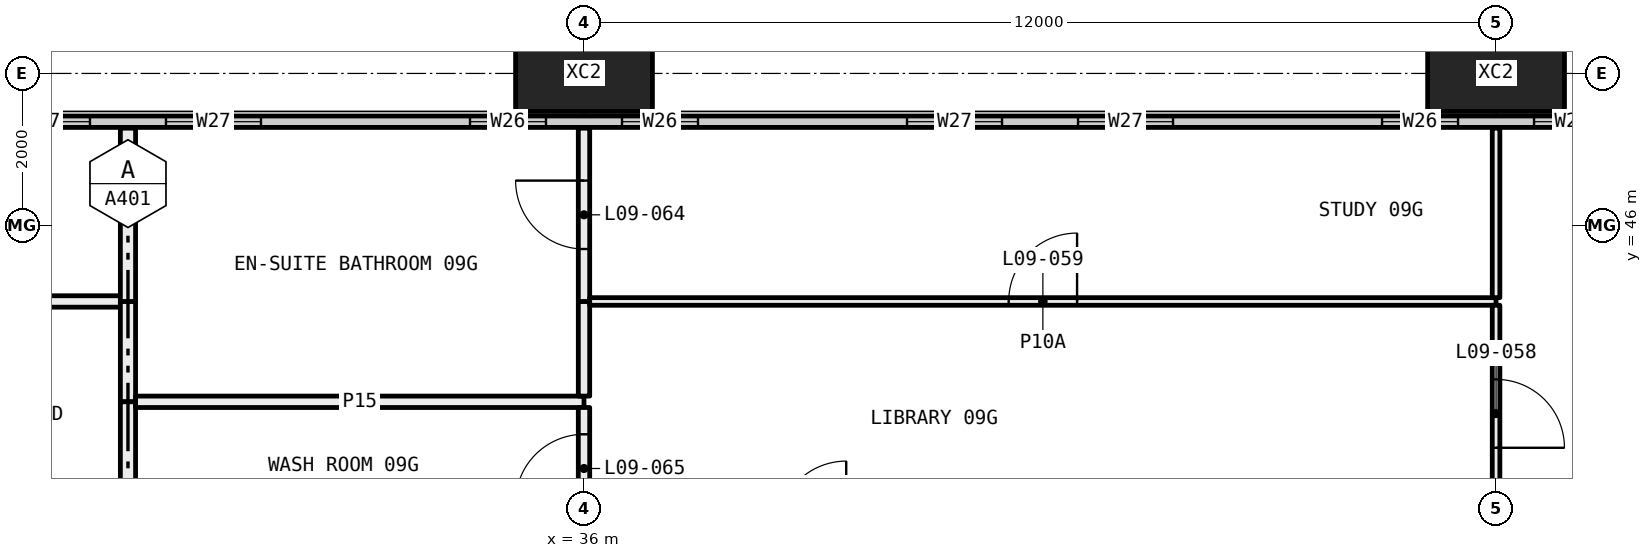
"""IFC4 building model, lengths in metres.
Left out: names, types, materials, properties, quantities, classifications, styles, units other than length and angle.
Written with IfcOpenShell. Run it as: python <this file> out.ifc"""

import sys

from ifc_helpers import new_model, si_unit, direction, frame, frame_2d, origin, origin_2d, place, context, subcontext, project, spatial, rectangle, hollow_rectangle, extrude, element, fill, save


model = new_model("IFC4")
c1 = context("Model", 3, precision=1e-05, world=origin(), true_north=direction((0.0, 1.0)))
c2 = subcontext(c1, "Body", "Model", "MODEL_VIEW")
j1 = project(units=[si_unit("LENGTHUNIT", "METRE"), si_unit("PLANEANGLEUNIT", "RADIAN")], contexts=[c1])
p1 = place(None, origin())
s1 = spatial("IfcSite", under=j1, at=p1, CompositionType="ELEMENT")
p2 = place(p1, origin())
s2 = spatial("IfcBuilding", under=s1, at=p2, CompositionType="ELEMENT")
p3 = place(p2, frame((0.0, 0.0, 43.8)))
s3 = spatial("IfcBuildingStorey", under=s2, at=p3, CompositionType="ELEMENT", Elevation=43.8)
for number, where, z_axis, x_axis in (
    (1, (36.0, 48.0, -0.4), (0.0, 0.0, 1.0), (1.0, 0.0, 0.0)),
    (2, (48.0, 48.0, -0.4), (0.0, 0.0, 1.0), (1.0, 0.0, 0.0)),
):
    element("IfcColumn", number, at=place(p3, frame(where, z_axis=z_axis, x_axis=x_axis)), inside=s3, PredefinedType="COLUMN", context=c2, shape_type="SweptSolid", body=[
        extrude(hollow_rectangle(XDim=1.8, YDim=1.0, WallThickness=0.07, at=origin_2d()), origin(), (0.0, 0.0, 1.0), 3.45),
    ])
p4 = place(p3, frame((6.56, 47.365, 0.0), z_axis=(0.0, 0.0, 1.0), x_axis=(1.0, 0.0, 0.0)))
e3 = element("IfcWall", 3, at=p4, inside=s3, PredefinedType="ELEMENTEDWALL", context=c2, shape_type="SweptSolid", body=[
    extrude(rectangle(XDim=58.88, YDim=0.15, at=frame_2d((29.44, 0.0))), origin(), (0.0, 0.0, 1.0), 3.05),
])
p5 = place(p4, frame((0.44, 0.0, 0.45)))
e4 = element("IfcOpeningElement", 4, at=p5, cuts=e3, PredefinedType="OPENING", context=c2, shape_type="SweptSolid", body=[
    extrude(rectangle(XDim=4.5, YDim=2.55, at=frame_2d((2.25, 1.275))), frame((0.0, 0.085, 0.0), z_axis=(0.0, -1.0, 0.0), x_axis=(1.0, 0.0, 0.0)), (0.0, 0.0, 1.0), 0.17),
])
p6 = place(p4, frame((5.94, 0.0, 0.45)))
e5 = element("IfcOpeningElement", 5, at=p6, cuts=e3, PredefinedType="OPENING", context=c2, shape_type="SweptSolid", body=[
    extrude(rectangle(XDim=1.0, YDim=2.55, at=frame_2d((0.5, 1.275))), frame((0.0, 0.085, 0.0), z_axis=(0.0, -1.0, 0.0), x_axis=(1.0, 0.0, 0.0)), (0.0, 0.0, 1.0), 0.17),
])
p7 = place(p4, frame((9.69, 0.0, 0.45)))
e6 = element("IfcOpeningElement", 6, at=p7, cuts=e3, PredefinedType="OPENING", context=c2, shape_type="SweptSolid", body=[
    extrude(rectangle(XDim=1.25, YDim=2.55, at=frame_2d((0.625, 1.275))), frame((0.0, 0.085, 0.0), z_axis=(0.0, -1.0, 0.0), x_axis=(1.0, 0.0, 0.0)), (0.0, 0.0, 1.0), 0.17),
])
p8 = place(p4, frame((11.94, 0.0, 0.45)))
e7 = element("IfcOpeningElement", 7, at=p8, cuts=e3, PredefinedType="OPENING", context=c2, shape_type="SweptSolid", body=[
    extrude(rectangle(XDim=1.25, YDim=2.55, at=frame_2d((0.625, 1.275))), frame((0.0, 0.085, 0.0), z_axis=(0.0, -1.0, 0.0), x_axis=(1.0, 0.0, 0.0)), (0.0, 0.0, 1.0), 0.17),
])
p9 = place(p4, frame((15.94, 0.0, 0.45)))
e8 = element("IfcOpeningElement", 8, at=p9, cuts=e3, PredefinedType="OPENING", context=c2, shape_type="SweptSolid", body=[
    extrude(rectangle(XDim=1.0, YDim=2.55, at=frame_2d((0.5, 1.275))), frame((0.0, 0.085, 0.0), z_axis=(0.0, -1.0, 0.0), x_axis=(1.0, 0.0, 0.0)), (0.0, 0.0, 1.0), 0.17),
])
p10 = place(p4, frame((17.94, 0.0, 0.45)))
e9 = element("IfcOpeningElement", 9, at=p10, cuts=e3, PredefinedType="OPENING", context=c2, shape_type="SweptSolid", body=[
    extrude(rectangle(XDim=1.0, YDim=2.55, at=frame_2d((0.5, 1.275))), frame((0.0, 0.085, 0.0), z_axis=(0.0, -1.0, 0.0), x_axis=(1.0, 0.0, 0.0)), (0.0, 0.0, 1.0), 0.17),
])
p11 = place(p4, frame((21.69, 0.0, 0.45)))
e10 = element("IfcOpeningElement", 10, at=p11, cuts=e3, PredefinedType="OPENING", context=c2, shape_type="SweptSolid", body=[
    extrude(rectangle(XDim=1.25, YDim=2.55, at=frame_2d((0.625, 1.275))), frame((0.0, 0.085, 0.0), z_axis=(0.0, -1.0, 0.0), x_axis=(1.0, 0.0, 0.0)), (0.0, 0.0, 1.0), 0.17),
])
p12 = place(p4, frame((23.94, 0.0, 0.45)))
e11 = element("IfcOpeningElement", 11, at=p12, cuts=e3, PredefinedType="OPENING", context=c2, shape_type="SweptSolid", body=[
    extrude(rectangle(XDim=1.25, YDim=2.55, at=frame_2d((0.625, 1.275))), frame((0.0, 0.085, 0.0), z_axis=(0.0, -1.0, 0.0), x_axis=(1.0, 0.0, 0.0)), (0.0, 0.0, 1.0), 0.17),
])
p13 = place(p4, frame((27.94, 0.0, 0.45)))
e12 = element("IfcOpeningElement", 12, at=p13, cuts=e3, PredefinedType="OPENING", context=c2, shape_type="SweptSolid", body=[
    extrude(rectangle(XDim=1.0, YDim=2.55, at=frame_2d((0.5, 1.275))), frame((0.0, 0.085, 0.0), z_axis=(0.0, -1.0, 0.0), x_axis=(1.0, 0.0, 0.0)), (0.0, 0.0, 1.0), 0.17),
])
p14 = place(p4, frame((29.94, 0.0, 0.45)))
e13 = element("IfcOpeningElement", 13, at=p14, cuts=e3, PredefinedType="OPENING", context=c2, shape_type="SweptSolid", body=[
    extrude(rectangle(XDim=1.0, YDim=2.55, at=frame_2d((0.5, 1.275))), frame((0.0, 0.085, 0.0), z_axis=(0.0, -1.0, 0.0), x_axis=(1.0, 0.0, 0.0)), (0.0, 0.0, 1.0), 0.17),
])
p15 = place(p4, frame((33.69, 0.0, 0.45)))
e14 = element("IfcOpeningElement", 14, at=p15, cuts=e3, PredefinedType="OPENING", context=c2, shape_type="SweptSolid", body=[
    extrude(rectangle(XDim=1.25, YDim=2.55, at=frame_2d((0.625, 1.275))), frame((0.0, 0.085, 0.0), z_axis=(0.0, -1.0, 0.0), x_axis=(1.0, 0.0, 0.0)), (0.0, 0.0, 1.0), 0.17),
])
p16 = place(p4, frame((35.94, 0.0, 0.45)))
e15 = element("IfcOpeningElement", 15, at=p16, cuts=e3, PredefinedType="OPENING", context=c2, shape_type="SweptSolid", body=[
    extrude(rectangle(XDim=1.25, YDim=2.55, at=frame_2d((0.625, 1.275))), frame((0.0, 0.085, 0.0), z_axis=(0.0, -1.0, 0.0), x_axis=(1.0, 0.0, 0.0)), (0.0, 0.0, 1.0), 0.17),
])
p17 = place(p4, frame((39.94, 0.0, 0.45)))
e16 = element("IfcOpeningElement", 16, at=p17, cuts=e3, PredefinedType="OPENING", context=c2, shape_type="SweptSolid", body=[
    extrude(rectangle(XDim=1.0, YDim=2.55, at=frame_2d((0.5, 1.275))), frame((0.0, 0.085, 0.0), z_axis=(0.0, -1.0, 0.0), x_axis=(1.0, 0.0, 0.0)), (0.0, 0.0, 1.0), 0.17),
])
p18 = place(p4, frame((41.94, 0.0, 0.45)))
e17 = element("IfcOpeningElement", 17, at=p18, cuts=e3, PredefinedType="OPENING", context=c2, shape_type="SweptSolid", body=[
    extrude(rectangle(XDim=1.0, YDim=2.55, at=frame_2d((0.5, 1.275))), frame((0.0, 0.085, 0.0), z_axis=(0.0, -1.0, 0.0), x_axis=(1.0, 0.0, 0.0)), (0.0, 0.0, 1.0), 0.17),
])
p19 = place(p4, frame((45.69, 0.0, 0.45)))
e18 = element("IfcOpeningElement", 18, at=p19, cuts=e3, PredefinedType="OPENING", context=c2, shape_type="SweptSolid", body=[
    extrude(rectangle(XDim=1.25, YDim=2.55, at=frame_2d((0.625, 1.275))), frame((0.0, 0.085, 0.0), z_axis=(0.0, -1.0, 0.0), x_axis=(1.0, 0.0, 0.0)), (0.0, 0.0, 1.0), 0.17),
])
p20 = place(p4, frame((47.94, 0.0, 0.45)))
e19 = element("IfcOpeningElement", 19, at=p20, cuts=e3, PredefinedType="OPENING", context=c2, shape_type="SweptSolid", body=[
    extrude(rectangle(XDim=1.25, YDim=2.55, at=frame_2d((0.625, 1.275))), frame((0.0, 0.085, 0.0), z_axis=(0.0, -1.0, 0.0), x_axis=(1.0, 0.0, 0.0)), (0.0, 0.0, 1.0), 0.17),
])
p21 = place(p4, frame((51.94, 0.0, 0.45)))
e20 = element("IfcOpeningElement", 20, at=p21, cuts=e3, PredefinedType="OPENING", context=c2, shape_type="SweptSolid", body=[
    extrude(rectangle(XDim=1.0, YDim=2.55, at=frame_2d((0.5, 1.275))), frame((0.0, 0.085, 0.0), z_axis=(0.0, -1.0, 0.0), x_axis=(1.0, 0.0, 0.0)), (0.0, 0.0, 1.0), 0.17),
])
p22 = place(p4, frame((53.94, 0.0, 0.45)))
e21 = element("IfcOpeningElement", 21, at=p22, cuts=e3, PredefinedType="OPENING", context=c2, shape_type="SweptSolid", body=[
    extrude(rectangle(XDim=4.5, YDim=2.55, at=frame_2d((2.25, 1.275))), frame((0.0, 0.085, 0.0), z_axis=(0.0, -1.0, 0.0), x_axis=(1.0, 0.0, 0.0)), (0.0, 0.0, 1.0), 0.17),
])
p23 = place(p3, frame((29.9, 45.0, 0.0), z_axis=(0.0, 0.0, 1.0), x_axis=(-1.0, 0.0, 0.0)))
e22 = element("IfcWall", 22, at=p23, inside=s3, PredefinedType="PARTITIONING", context=c2, shape_type="SweptSolid", body=[
    extrude(rectangle(XDim=5.825, YDim=0.15, at=frame_2d((2.913, 0.0))), origin(), (0.0, 0.0, 1.0), 3.05),
])
p24 = place(p3, frame((30.0, 43.68, 0.0), z_axis=(0.0, 0.0, 1.0), x_axis=(0.0, 1.0, 0.0)))
e23 = element("IfcWall", 23, at=p24, inside=s3, PredefinedType="PARTITIONING", context=c2, shape_type="SweptSolid", body=[
    extrude(rectangle(XDim=1.32, YDim=0.2, at=frame_2d((0.66, 0.0))), origin(), (0.0, 0.0, 1.0), 3.05),
])
p25 = place(p3, frame((30.0, 42.1, 0.0), z_axis=(0.0, 0.0, 1.0), x_axis=(0.0, 1.0, 0.0)))
e24 = element("IfcWall", 24, at=p25, inside=s3, PredefinedType="PARTITIONING", context=c2, shape_type="SweptSolid", body=[
    extrude(rectangle(XDim=1.58, YDim=0.2, at=frame_2d((0.79, 0.0))), origin(), (0.0, 0.0, 1.0), 3.05),
])
p26 = place(p3, frame((30.0, 45.0, 0.0), z_axis=(0.0, 0.0, 1.0), x_axis=(0.0, 1.0, 0.0)))
e25 = element("IfcWall", 25, at=p26, inside=s3, PredefinedType="PARTITIONING", context=c2, shape_type="SweptSolid", body=[
    extrude(rectangle(XDim=2.28, YDim=0.2, at=frame_2d((1.14, 0.0))), origin(), (0.0, 0.0, 1.0), 3.05),
])
p27 = place(p3, frame((30.1, 43.68, 0.0), z_axis=(0.0, 0.0, 1.0), x_axis=(1.0, 0.0, 0.0)))
e26 = element("IfcWall", 26, at=p27, inside=s3, PredefinedType="PARTITIONING", context=c2, shape_type="SweptSolid", body=[
    extrude(rectangle(XDim=5.9, YDim=0.15, at=frame_2d((2.95, 0.0))), origin(), (0.0, 0.0, 1.0), 2.45),
])
p28 = place(p3, frame((36.0, 43.755, 0.0), z_axis=(0.0, 0.0, 1.0), x_axis=(0.0, 1.0, 0.0)))
e27 = element("IfcWall", 27, at=p28, inside=s3, PredefinedType="PARTITIONING", context=c2, shape_type="SweptSolid", body=[
    extrude(rectangle(XDim=1.245, YDim=0.15, at=frame_2d((0.623, 0.0))), origin(), (0.0, 0.0, 1.0), 2.45),
])
p29 = place(p3, frame((36.0, 45.0, 0.0), z_axis=(0.0, 0.0, 1.0), x_axis=(0.0, 1.0, 0.0)))
e28 = element("IfcWall", 28, at=p29, inside=s3, PredefinedType="PARTITIONING", context=c2, shape_type="SweptSolid", body=[
    extrude(rectangle(XDim=2.28, YDim=0.15, at=frame_2d((1.14, 0.0))), origin(), (0.0, 0.0, 1.0), 2.45),
])
p30 = place(p29, frame((0.69, 0.0, 0.0)))
e29 = element("IfcOpeningElement", 29, at=p30, cuts=e28, PredefinedType="OPENING", context=c2, shape_type="SweptSolid", body=[
    extrude(rectangle(XDim=0.9, YDim=2.1, at=frame_2d((0.45, 1.05))), frame((0.0, 0.085, 0.0), z_axis=(0.0, -1.0, 0.0), x_axis=(1.0, 0.0, 0.0)), (0.0, 0.0, 1.0), 0.17),
])
p31 = place(p3, frame((36.0, 42.0, 0.0), z_axis=(0.0, 0.0, 1.0), x_axis=(0.0, 1.0, 0.0)))
e30 = element("IfcWall", 30, at=p31, inside=s3, PredefinedType="PARTITIONING", context=c2, shape_type="SweptSolid", body=[
    extrude(rectangle(XDim=1.605, YDim=0.15, at=frame_2d((0.802, 0.0))), origin(), (0.0, 0.0, 1.0), 2.45),
])
p32 = place(p31, frame((0.353, 0.0, 0.0)))
e31 = element("IfcOpeningElement", 31, at=p32, cuts=e30, PredefinedType="OPENING", context=c2, shape_type="SweptSolid", body=[
    extrude(rectangle(XDim=0.9, YDim=2.1, at=frame_2d((0.45, 1.05))), frame((0.0, 0.085, 0.0), z_axis=(0.0, -1.0, 0.0), x_axis=(1.0, 0.0, 0.0)), (0.0, 0.0, 1.0), 0.17),
])
p33 = place(p3, frame((48.0, 45.0, 0.0), z_axis=(0.0, 0.0, 1.0), x_axis=(-1.0, 0.0, 0.0)))
e32 = element("IfcWall", 32, at=p33, inside=s3, PredefinedType="PARTITIONING", context=c2, shape_type="SweptSolid", body=[
    extrude(rectangle(XDim=11.925, YDim=0.1, at=frame_2d((5.962, 0.0))), origin(), (0.0, 0.0, 1.0), 2.45),
])
p34 = place(p33, frame((5.512, 0.0, 0.0)))
e33 = element("IfcOpeningElement", 33, at=p34, cuts=e32, PredefinedType="OPENING", context=c2, shape_type="SweptSolid", body=[
    extrude(rectangle(XDim=0.9, YDim=2.1, at=frame_2d((0.45, 1.05))), frame((0.0, 0.06, 0.0), z_axis=(0.0, -1.0, 0.0), x_axis=(1.0, 0.0, 0.0)), (0.0, 0.0, 1.0), 0.12),
])
p35 = place(p3, frame((48.0, 42.1, 0.0), z_axis=(0.0, 0.0, 1.0), x_axis=(0.0, 1.0, 0.0)))
e34 = element("IfcWall", 34, at=p35, inside=s3, PredefinedType="PARTITIONING", context=c2, shape_type="SweptSolid", body=[
    extrude(rectangle(XDim=2.85, YDim=0.1, at=frame_2d((1.425, 0.0))), origin(), (0.0, 0.0, 1.0), 3.05),
])
p36 = place(p35, frame((0.975, 0.0, 0.0)))
e35 = element("IfcOpeningElement", 35, at=p36, cuts=e34, PredefinedType="OPENING", context=c2, shape_type="SweptSolid", body=[
    extrude(rectangle(XDim=0.9, YDim=2.1, at=frame_2d((0.45, 1.05))), frame((0.0, 0.06, 0.0), z_axis=(0.0, -1.0, 0.0), x_axis=(1.0, 0.0, 0.0)), (0.0, 0.0, 1.0), 0.12),
])
p37 = place(p3, frame((48.0, 45.05, 0.0), z_axis=(0.0, 0.0, 1.0), x_axis=(0.0, 1.0, 0.0)))
e36 = element("IfcWall", 36, at=p37, inside=s3, PredefinedType="PARTITIONING", context=c2, shape_type="SweptSolid", body=[
    extrude(rectangle(XDim=2.23, YDim=0.1, at=frame_2d((1.115, 0.0))), origin(), (0.0, 0.0, 1.0), 3.05),
])
p38 = place(p11, origin())
e37 = element("IfcWindow", 37, at=p38, inside=s3, PartitioningType="SINGLE_PANEL", PredefinedType="WINDOW", context=c2, shape_type="SweptSolid", body=[
    extrude(rectangle(XDim=1.25, YDim=2.55, at=frame_2d((0.625, 1.275))), frame((0.0, 0.03, 0.0), z_axis=(0.0, -1.0, 0.0), x_axis=(1.0, 0.0, 0.0)), (0.0, 0.0, 1.0), 0.06),
])
fill(e10, e37)
p39 = place(p12, origin())
e38 = element("IfcWindow", 38, at=p39, inside=s3, PartitioningType="SINGLE_PANEL", PredefinedType="WINDOW", context=c2, shape_type="SweptSolid", body=[
    extrude(rectangle(XDim=1.25, YDim=2.55, at=frame_2d((0.625, 1.275))), frame((0.0, 0.03, 0.0), z_axis=(0.0, -1.0, 0.0), x_axis=(1.0, 0.0, 0.0)), (0.0, 0.0, 1.0), 0.06),
])
fill(e11, e38)
p40 = place(p13, origin())
e39 = element("IfcWindow", 39, at=p40, inside=s3, PartitioningType="SINGLE_PANEL", PredefinedType="WINDOW", context=c2, shape_type="SweptSolid", body=[
    extrude(rectangle(XDim=1.0, YDim=2.55, at=frame_2d((0.5, 1.275))), frame((0.0, 0.03, 0.0), z_axis=(0.0, -1.0, 0.0), x_axis=(1.0, 0.0, 0.0)), (0.0, 0.0, 1.0), 0.06),
])
fill(e12, e39)
p41 = place(p14, origin())
e40 = element("IfcWindow", 40, at=p41, inside=s3, PartitioningType="SINGLE_PANEL", PredefinedType="WINDOW", context=c2, shape_type="SweptSolid", body=[
    extrude(rectangle(XDim=1.0, YDim=2.55, at=frame_2d((0.5, 1.275))), frame((0.0, 0.03, 0.0), z_axis=(0.0, -1.0, 0.0), x_axis=(1.0, 0.0, 0.0)), (0.0, 0.0, 1.0), 0.06),
])
fill(e13, e40)
p42 = place(p15, origin())
e41 = element("IfcWindow", 41, at=p42, inside=s3, PartitioningType="SINGLE_PANEL", PredefinedType="WINDOW", context=c2, shape_type="SweptSolid", body=[
    extrude(rectangle(XDim=1.25, YDim=2.55, at=frame_2d((0.625, 1.275))), frame((0.0, 0.03, 0.0), z_axis=(0.0, -1.0, 0.0), x_axis=(1.0, 0.0, 0.0)), (0.0, 0.0, 1.0), 0.06),
])
fill(e14, e41)
p43 = place(p16, origin())
e42 = element("IfcWindow", 42, at=p43, inside=s3, PartitioningType="SINGLE_PANEL", PredefinedType="WINDOW", context=c2, shape_type="SweptSolid", body=[
    extrude(rectangle(XDim=1.25, YDim=2.55, at=frame_2d((0.625, 1.275))), frame((0.0, 0.03, 0.0), z_axis=(0.0, -1.0, 0.0), x_axis=(1.0, 0.0, 0.0)), (0.0, 0.0, 1.0), 0.06),
])
fill(e15, e42)
p44 = place(p17, origin())
e43 = element("IfcWindow", 43, at=p44, inside=s3, PartitioningType="SINGLE_PANEL", PredefinedType="WINDOW", context=c2, shape_type="SweptSolid", body=[
    extrude(rectangle(XDim=1.0, YDim=2.55, at=frame_2d((0.5, 1.275))), frame((0.0, 0.03, 0.0), z_axis=(0.0, -1.0, 0.0), x_axis=(1.0, 0.0, 0.0)), (0.0, 0.0, 1.0), 0.06),
])
fill(e16, e43)
p45 = place(p18, origin())
e44 = element("IfcWindow", 44, at=p45, inside=s3, PartitioningType="SINGLE_PANEL", PredefinedType="WINDOW", context=c2, shape_type="SweptSolid", body=[
    extrude(rectangle(XDim=1.0, YDim=2.55, at=frame_2d((0.5, 1.275))), frame((0.0, 0.03, 0.0), z_axis=(0.0, -1.0, 0.0), x_axis=(1.0, 0.0, 0.0)), (0.0, 0.0, 1.0), 0.06),
])
fill(e17, e44)
p46 = place(p36, frame((0.9, 0.0, 0.0), x_axis=(-1.0, 0.0, 0.0)))
e45 = element("IfcDoor", 45, at=p46, inside=s3, OperationType="SINGLE_SWING_LEFT", PredefinedType="DOOR", context=c2, shape_type="SweptSolid", body=[
    extrude(rectangle(XDim=0.9, YDim=2.1, at=frame_2d((0.45, 1.05))), frame((0.0, 0.025, 0.0), z_axis=(0.0, -1.0, 0.0), x_axis=(1.0, 0.0, 0.0)), (0.0, 0.0, 1.0), 0.05),
])
fill(e35, e45)
p47 = place(p34, frame((0.9, 0.0, 0.0), x_axis=(-1.0, 0.0, 0.0)))
e46 = element("IfcDoor", 46, at=p47, inside=s3, OperationType="SINGLE_SWING_LEFT", PredefinedType="DOOR", context=c2, shape_type="SweptSolid", body=[
    extrude(rectangle(XDim=0.9, YDim=2.1, at=frame_2d((0.45, 1.05))), frame((0.0, 0.025, 0.0), z_axis=(0.0, -1.0, 0.0), x_axis=(1.0, 0.0, 0.0)), (0.0, 0.0, 1.0), 0.05),
])
fill(e33, e46)
p48 = place(p30, origin())
e47 = element("IfcDoor", 47, at=p48, inside=s3, OperationType="SINGLE_SWING_LEFT", PredefinedType="DOOR", context=c2, shape_type="SweptSolid", body=[
    extrude(rectangle(XDim=0.9, YDim=2.1, at=frame_2d((0.45, 1.05))), frame((0.0, 0.025, 0.0), z_axis=(0.0, -1.0, 0.0), x_axis=(1.0, 0.0, 0.0)), (0.0, 0.0, 1.0), 0.05),
])
fill(e29, e47)
p49 = place(p32, origin())
e48 = element("IfcDoor", 48, at=p49, inside=s3, OperationType="SINGLE_SWING_RIGHT", PredefinedType="DOOR", context=c2, shape_type="SweptSolid", body=[
    extrude(rectangle(XDim=0.9, YDim=2.1, at=frame_2d((0.45, 1.05))), frame((0.0, 0.025, 0.0), z_axis=(0.0, -1.0, 0.0), x_axis=(1.0, 0.0, 0.0)), (0.0, 0.0, 1.0), 0.05),
])
fill(e31, e48)
save(model, sys.argv[1])
